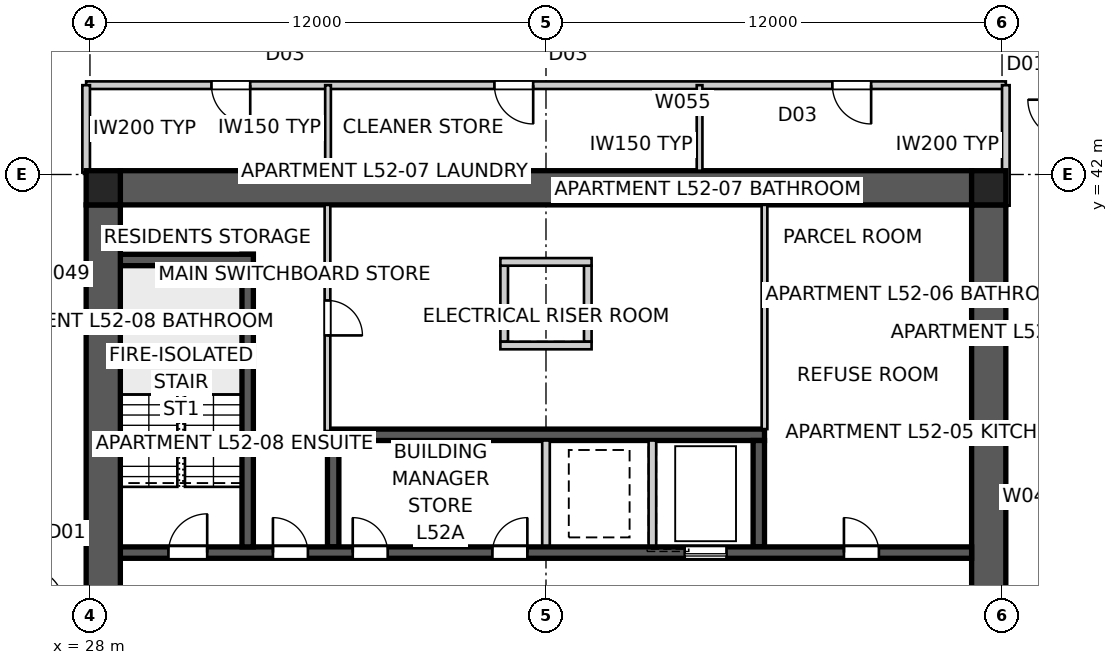
"""IFC4 building model, lengths in metres.
Left out: names, types, materials, properties, quantities, classifications, styles, units other than length and angle.
Written with IfcOpenShell. Run it as: python <this file> out.ifc"""

import sys

from ifc_helpers import new_model, si_unit, direction, frame, frame_2d, origin, origin_2d, place, context, subcontext, project, spatial, polyline, rectangle, outline, extrude, element, fill, save


model = new_model("IFC4")
c1 = context("Model", 3, precision=1e-05, world=origin(), true_north=direction((0.0, 1.0)))
c2 = subcontext(c1, "Body", "Model", "MODEL_VIEW")
j1 = project(units=[si_unit("LENGTHUNIT", "METRE"), si_unit("PLANEANGLEUNIT", "RADIAN")], contexts=[c1])
p1 = place(None, origin())
s1 = spatial("IfcSite", under=j1, at=p1, CompositionType="ELEMENT")
p2 = place(p1, origin())
s2 = spatial("IfcBuilding", under=s1, at=p2, CompositionType="ELEMENT")
p3 = place(p2, frame((0.0, 0.0, 189.6)))
s3 = spatial("IfcBuildingStorey", under=s2, at=p3, CompositionType="ELEMENT", Elevation=189.6)
p4 = place(p3, frame((28.8, 41.65, 0.0), z_axis=(0.0, 0.0, 1.0), x_axis=(1.0, 0.0, 0.0)))
e1 = element("IfcWall", 1, at=p4, inside=s3, PredefinedType="SHEAR", context=c2, shape_type="SweptSolid", body=[
    extrude(outline(polyline([(0.0, -0.45), (22.4, -0.45), (22.4, -0.025), (22.85, -0.025), (22.85, 0.025), (22.4, 0.025), (22.4, 0.45), (0.0, 0.45), (0.0, 0.025), (-0.45, 0.025), (-0.45, -0.025), (0.0, -0.025), (0.0, -0.45)])), origin(), (0.0, 0.0, 1.0), 3.4),
])
p5 = place(p3, frame((51.65, 18.8, 0.0), z_axis=(0.0, 0.0, 1.0), x_axis=(0.0, 1.0, 0.0)))
e2 = element("IfcWall", 2, at=p5, inside=s3, PredefinedType="SHEAR", context=c2, shape_type="SweptSolid", body=[
    extrude(outline(polyline([(0.0, -0.45), (22.4, -0.45), (22.4, -0.025), (22.85, -0.025), (22.85, 0.025), (22.4, 0.025), (22.4, 0.45), (0.0, 0.45), (0.0, 0.025), (-0.45, 0.025), (-0.45, -0.025), (0.0, -0.025), (0.0, -0.45)])), origin(), (0.0, 0.0, 1.0), 3.4),
])
p6 = place(p5, frame((11.14, 0.0, 0.0)))
e3 = element("IfcOpeningElement", 3, at=p6, cuts=e2, PredefinedType="OPENING", context=c2, shape_type="SweptSolid", body=[
    extrude(rectangle(XDim=1.02, YDim=2.4, at=frame_2d((0.51, 1.2))), frame((0.0, 0.46, 0.0), z_axis=(0.0, -1.0, 0.0), x_axis=(1.0, 0.0, 0.0)), (0.0, 0.0, 1.0), 0.92),
])
p7 = place(p3, frame((28.35, 41.2, 0.0), z_axis=(0.0, 0.0, 1.0), x_axis=(0.0, -1.0, 0.0)))
e4 = element("IfcWall", 4, at=p7, inside=s3, PredefinedType="SHEAR", context=c2, shape_type="SweptSolid", body=[
    extrude(outline(polyline([(0.0, -0.45), (22.4, -0.45), (22.4, -0.025), (22.85, -0.025), (22.85, 0.025), (22.4, 0.025), (22.4, 0.45), (0.0, 0.45), (0.0, 0.025), (-0.45, 0.025), (-0.45, -0.025), (0.0, -0.025), (0.0, -0.45)])), origin(), (0.0, 0.0, 1.0), 3.4),
])
p8 = place(p7, frame((11.14, 0.0, 0.0)))
e5 = element("IfcOpeningElement", 5, at=p8, cuts=e4, PredefinedType="OPENING", context=c2, shape_type="SweptSolid", body=[
    extrude(rectangle(XDim=1.02, YDim=2.4, at=frame_2d((0.51, 1.2))), frame((0.0, 0.46, 0.0), z_axis=(0.0, -1.0, 0.0), x_axis=(1.0, 0.0, 0.0)), (0.0, 0.0, 1.0), 0.92),
])
p9 = place(p3, frame((28.8, 32.05, 0.0), z_axis=(0.0, 0.0, 1.0), x_axis=(1.0, 0.0, 0.0)))
e6 = element("IfcWall", 6, at=p9, inside=s3, PredefinedType="SHEAR", context=c2, shape_type="SweptSolid", body=[
    extrude(rectangle(XDim=22.4, YDim=0.3, at=frame_2d((11.2, 0.0))), origin(), (0.0, 0.0, 1.0), 3.4),
])
p10 = place(p9, frame((19.04, 0.0, 0.0)))
e7 = element("IfcOpeningElement", 7, at=p10, cuts=e6, PredefinedType="OPENING", context=c2, shape_type="SweptSolid", body=[
    extrude(rectangle(XDim=0.92, YDim=2.1, at=frame_2d((0.46, 1.05))), frame((0.0, 0.16, 0.0), z_axis=(0.0, -1.0, 0.0), x_axis=(1.0, 0.0, 0.0)), (0.0, 0.0, 1.0), 0.32),
])
p11 = place(p9, frame((1.265, 0.0, 0.0)))
e8 = element("IfcOpeningElement", 8, at=p11, cuts=e6, PredefinedType="OPENING", context=c2, shape_type="SweptSolid", body=[
    extrude(rectangle(XDim=1.02, YDim=2.1, at=frame_2d((0.51, 1.05))), frame((0.0, 0.16, 0.0), z_axis=(0.0, -1.0, 0.0), x_axis=(1.0, 0.0, 0.0)), (0.0, 0.0, 1.0), 0.32),
])
p12 = place(p9, frame((4.015, 0.0, 0.0)))
e9 = element("IfcOpeningElement", 9, at=p12, cuts=e6, PredefinedType="OPENING", context=c2, shape_type="SweptSolid", body=[
    extrude(rectangle(XDim=0.92, YDim=2.1, at=frame_2d((0.46, 1.05))), frame((0.0, 0.16, 0.0), z_axis=(0.0, -1.0, 0.0), x_axis=(1.0, 0.0, 0.0)), (0.0, 0.0, 1.0), 0.32),
])
p13 = place(p9, frame((6.115, 0.0, 0.0)))
e10 = element("IfcOpeningElement", 10, at=p13, cuts=e6, PredefinedType="OPENING", context=c2, shape_type="SweptSolid", body=[
    extrude(rectangle(XDim=0.92, YDim=2.1, at=frame_2d((0.46, 1.05))), frame((0.0, 0.16, 0.0), z_axis=(0.0, -1.0, 0.0), x_axis=(1.0, 0.0, 0.0)), (0.0, 0.0, 1.0), 0.32),
])
p14 = place(p9, frame((9.79, 0.0, 0.0)))
e11 = element("IfcOpeningElement", 11, at=p14, cuts=e6, PredefinedType="OPENING", context=c2, shape_type="SweptSolid", body=[
    extrude(rectangle(XDim=0.92, YDim=2.1, at=frame_2d((0.46, 1.05))), frame((0.0, 0.16, 0.0), z_axis=(0.0, -1.0, 0.0), x_axis=(1.0, 0.0, 0.0)), (0.0, 0.0, 1.0), 0.32),
])
p15 = place(p9, frame((14.85, 0.0, 0.0)))
e12 = element("IfcOpeningElement", 12, at=p15, cuts=e6, PredefinedType="OPENING", context=c2, shape_type="SweptSolid", body=[
    extrude(rectangle(XDim=1.1, YDim=2.1, at=frame_2d((0.55, 1.05))), frame((0.0, 0.16, 0.0), z_axis=(0.0, -1.0, 0.0), x_axis=(1.0, 0.0, 0.0)), (0.0, 0.0, 1.0), 0.32),
])
p16 = place(p3, frame((34.25, 35.15, 0.0), z_axis=(0.0, 0.0, 1.0), x_axis=(1.0, 0.0, 0.0)))
e13 = element("IfcWall", 13, at=p16, inside=s3, PredefinedType="SHEAR", context=c2, shape_type="SweptSolid", body=[
    extrude(rectangle(XDim=11.5, YDim=0.3, at=frame_2d((5.75, 0.0))), origin(), (0.0, 0.0, 1.0), 3.4),
])
p17 = place(p3, frame((34.4, 32.2, 0.0), z_axis=(0.0, 0.0, 1.0), x_axis=(0.0, 1.0, 0.0)))
e14 = element("IfcWall", 14, at=p17, inside=s3, PredefinedType="SHEAR", context=c2, shape_type="SweptSolid", body=[
    extrude(rectangle(XDim=2.8, YDim=0.3, at=frame_2d((1.4, 0.0))), origin(), (0.0, 0.0, 1.0), 3.4),
])
for number, where, z_axis, x_axis in (
    (15, (40.0, 32.2, 0.0), (0.0, 0.0, 1.0), (0.0, 1.0, 0.0)),
    (16, (42.8, 32.2, 0.0), (0.0, 0.0, 1.0), (0.0, 1.0, 0.0)),
):
    element("IfcWall", number, at=place(p3, frame(where, z_axis=z_axis, x_axis=x_axis)), inside=s3, PredefinedType="SOLIDWALL", context=c2, shape_type="SweptSolid", body=[
        extrude(rectangle(XDim=2.8, YDim=0.2, at=frame_2d((1.4, 0.0))), origin(), (0.0, 0.0, 1.0), 3.4),
    ])
p18 = place(p3, frame((45.6, 32.2, 0.0), z_axis=(0.0, 0.0, 1.0), x_axis=(0.0, 1.0, 0.0)))
e17 = element("IfcWall", 17, at=p18, inside=s3, PredefinedType="SHEAR", context=c2, shape_type="SweptSolid", body=[
    extrude(rectangle(XDim=2.8, YDim=0.3, at=frame_2d((1.4, 0.0))), origin(), (0.0, 0.0, 1.0), 3.4),
])
p19 = place(p3, frame((32.15, 32.2, 0.0), z_axis=(0.0, 0.0, 1.0), x_axis=(0.0, 1.0, 0.0)))
e18 = element("IfcWall", 18, at=p19, inside=s3, PredefinedType="SHEAR", context=c2, shape_type="SweptSolid", body=[
    extrude(rectangle(XDim=7.7, YDim=0.3, at=frame_2d((3.85, 0.0))), origin(), (0.0, 0.0, 1.0), 3.4),
])
p20 = place(p3, frame((28.8, 39.75, 0.0), z_axis=(0.0, 0.0, 1.0), x_axis=(1.0, 0.0, 0.0)))
e19 = element("IfcWall", 19, at=p20, inside=s3, PredefinedType="SHEAR", context=c2, shape_type="SweptSolid", body=[
    extrude(rectangle(XDim=3.5, YDim=0.3, at=frame_2d((1.75, 0.0))), origin(), (0.0, 0.0, 1.0), 3.4),
])
for number, where, z_axis, x_axis in (
    (20, (38.9, 37.6, 0.0), (0.0, 0.0, 1.0), (0.0, 1.0, 0.0)),
    (21, (41.1, 37.6, 0.0), (0.0, 0.0, 1.0), (0.0, 1.0, 0.0)),
):
    element("IfcWall", number, at=place(p3, frame(where, z_axis=z_axis, x_axis=x_axis)), inside=s3, PredefinedType="SOLIDWALL", context=c2, shape_type="SweptSolid", body=[
        extrude(rectangle(XDim=2.0, YDim=0.2, at=frame_2d((1.0, 0.0))), origin(), (0.0, 0.0, 1.0), 3.4),
    ])
for number, where, z_axis, x_axis in (
    (22, (38.8, 37.5, 0.0), (0.0, 0.0, 1.0), (1.0, 0.0, 0.0)),
    (23, (38.8, 39.7, 0.0), (0.0, 0.0, 1.0), (1.0, 0.0, 0.0)),
):
    element("IfcWall", number, at=place(p3, frame(where, z_axis=z_axis, x_axis=x_axis)), inside=s3, PredefinedType="SOLIDWALL", context=c2, shape_type="SweptSolid", body=[
        extrude(rectangle(XDim=2.4, YDim=0.2, at=frame_2d((1.2, 0.0))), origin(), (0.0, 0.0, 1.0), 3.4),
    ])
for number, where, z_axis, x_axis in (
    (24, (51.65, 41.65, 0.0), (0.0, 0.0, 1.0), (1.0, 0.0, 0.0)),
    (25, (28.35, 41.65, 0.0), (0.0, 0.0, 1.0), (1.0, 0.0, 0.0)),
):
    element("IfcColumn", number, at=place(p3, frame(where, z_axis=z_axis, x_axis=x_axis)), inside=s3, PredefinedType="COLUMN", context=c2, shape_type="SweptSolid", body=[
        extrude(rectangle(XDim=0.9, YDim=0.9, at=origin_2d()), origin(), (0.0, 0.0, 1.0), 3.4),
    ])
p21 = place(p3, frame((34.25, 41.2, 0.0), z_axis=(0.0, 0.0, 1.0), x_axis=(0.0, -1.0, 0.0)))
e26 = element("IfcWall", 26, at=p21, inside=s3, PredefinedType="SOLIDWALL", context=c2, shape_type="SweptSolid", body=[
    extrude(rectangle(XDim=5.95, YDim=0.15, at=frame_2d((2.975, 0.0))), origin(), (0.0, 0.0, 1.0), 3.25),
])
p22 = place(p21, frame((2.515, 0.0, 0.0)))
e27 = element("IfcOpeningElement", 27, at=p22, cuts=e26, PredefinedType="OPENING", context=c2, shape_type="SweptSolid", body=[
    extrude(rectangle(XDim=0.92, YDim=2.1, at=frame_2d((0.46, 1.05))), frame((0.0, 0.085, 0.0), z_axis=(0.0, -1.0, 0.0), x_axis=(1.0, 0.0, 0.0)), (0.0, 0.0, 1.0), 0.17),
])
p23 = place(p3, frame((45.75, 41.2, 0.0), z_axis=(0.0, 0.0, 1.0), x_axis=(0.0, -1.0, 0.0)))
e28 = element("IfcWall", 28, at=p23, inside=s3, PredefinedType="SOLIDWALL", context=c2, shape_type="SweptSolid", body=[
    extrude(rectangle(XDim=5.9, YDim=0.15, at=frame_2d((2.95, 0.0))), origin(), (0.0, 0.0, 1.0), 3.25),
])
p24 = place(p3, frame((52.1, 44.35, 0.0), z_axis=(0.0, 0.0, 1.0), x_axis=(-1.0, 0.0, 0.0)))
e29 = element("IfcWall", 29, at=p24, inside=s3, PredefinedType="PARTITIONING", context=c2, shape_type="SweptSolid", body=[
    extrude(rectangle(XDim=24.2, YDim=0.2, at=frame_2d((12.1, 0.0))), origin(), (0.0, 0.0, 1.0), 3.25),
])
p25 = place(p24, frame((12.437, 0.0, 0.0)))
e30 = element("IfcOpeningElement", 30, at=p25, cuts=e29, PredefinedType="OPENING", context=c2, shape_type="SweptSolid", body=[
    extrude(rectangle(XDim=1.02, YDim=2.1, at=frame_2d((0.51, 1.05))), frame((0.0, 0.11, 0.0), z_axis=(0.0, -1.0, 0.0), x_axis=(1.0, 0.0, 0.0)), (0.0, 0.0, 1.0), 0.22),
])
p26 = place(p24, frame((3.544, 0.0, 0.0)))
e31 = element("IfcOpeningElement", 31, at=p26, cuts=e29, PredefinedType="OPENING", context=c2, shape_type="SweptSolid", body=[
    extrude(rectangle(XDim=1.02, YDim=2.1, at=frame_2d((0.51, 1.05))), frame((0.0, 0.11, 0.0), z_axis=(0.0, -1.0, 0.0), x_axis=(1.0, 0.0, 0.0)), (0.0, 0.0, 1.0), 0.22),
])
p27 = place(p24, frame((19.883, 0.0, 0.0)))
e32 = element("IfcOpeningElement", 32, at=p27, cuts=e29, PredefinedType="OPENING", context=c2, shape_type="SweptSolid", body=[
    extrude(rectangle(XDim=1.02, YDim=2.1, at=frame_2d((0.51, 1.05))), frame((0.0, 0.11, 0.0), z_axis=(0.0, -1.0, 0.0), x_axis=(1.0, 0.0, 0.0)), (0.0, 0.0, 1.0), 0.22),
])
p28 = place(p3, frame((27.9, 44.35, 0.0), z_axis=(0.0, 0.0, 1.0), x_axis=(0.0, -1.0, 0.0)))
e33 = element("IfcWall", 33, at=p28, inside=s3, PredefinedType="PARTITIONING", context=c2, shape_type="SweptSolid", body=[
    extrude(rectangle(XDim=2.3, YDim=0.2, at=frame_2d((1.15, 0.0))), origin(), (0.0, 0.0, 1.0), 3.25),
])
p29 = place(p3, frame((52.1, 41.18, 0.0), z_axis=(0.0, 0.0, 1.0), x_axis=(0.0, 1.0, 0.0)))
e34 = element("IfcWall", 34, at=p29, inside=s3, PredefinedType="PARTITIONING", context=c2, shape_type="SweptSolid", body=[
    extrude(rectangle(XDim=3.17, YDim=0.2, at=frame_2d((1.585, 0.0))), origin(), (0.0, 0.0, 1.0), 3.25),
])
p30 = place(p3, frame((34.265, 42.1, 0.0), z_axis=(0.0, 0.0, 1.0), x_axis=(0.0, 1.0, 0.0)))
e35 = element("IfcWall", 35, at=p30, inside=s3, PredefinedType="SOLIDWALL", context=c2, shape_type="SweptSolid", body=[
    extrude(rectangle(XDim=2.25, YDim=0.15, at=frame_2d((1.125, 0.0))), origin(), (0.0, 0.0, 1.0), 2.796),
])
p31 = place(p3, frame((44.042, 42.1, 0.0), z_axis=(0.0, 0.0, 1.0), x_axis=(0.0, 1.0, 0.0)))
e36 = element("IfcWall", 36, at=p31, inside=s3, PredefinedType="SOLIDWALL", context=c2, shape_type="SweptSolid", body=[
    extrude(rectangle(XDim=2.25, YDim=0.15, at=frame_2d((1.125, 0.0))), origin(), (0.0, 0.0, 1.0), 3.25),
])
p32 = place(p10, origin())
e37 = element("IfcDoor", 37, at=p32, inside=s3, OperationType="SINGLE_SWING_LEFT", PredefinedType="DOOR", context=c2, shape_type="SweptSolid", body=[
    extrude(rectangle(XDim=0.92, YDim=2.1, at=frame_2d((0.46, 1.05))), frame((0.0, 0.025, 0.0), z_axis=(0.0, -1.0, 0.0), x_axis=(1.0, 0.0, 0.0)), (0.0, 0.0, 1.0), 0.05),
])
fill(e7, e37)
p33 = place(p11, origin())
e38 = element("IfcDoor", 38, at=p33, inside=s3, OperationType="SINGLE_SWING_RIGHT", PredefinedType="DOOR", context=c2, shape_type="SweptSolid", body=[
    extrude(rectangle(XDim=1.02, YDim=2.1, at=frame_2d((0.51, 1.05))), frame((0.0, 0.025, 0.0), z_axis=(0.0, -1.0, 0.0), x_axis=(1.0, 0.0, 0.0)), (0.0, 0.0, 1.0), 0.05),
])
fill(e8, e38)
p34 = place(p12, origin())
e39 = element("IfcDoor", 39, at=p34, inside=s3, OperationType="SINGLE_SWING_LEFT", PredefinedType="DOOR", context=c2, shape_type="SweptSolid", body=[
    extrude(rectangle(XDim=0.92, YDim=2.1, at=frame_2d((0.46, 1.05))), frame((0.0, 0.025, 0.0), z_axis=(0.0, -1.0, 0.0), x_axis=(1.0, 0.0, 0.0)), (0.0, 0.0, 1.0), 0.05),
])
fill(e9, e39)
p35 = place(p25, origin())
e40 = element("IfcDoor", 40, at=p35, inside=s3, OperationType="SINGLE_SWING_LEFT", PredefinedType="DOOR", context=c2, shape_type="SweptSolid", body=[
    extrude(rectangle(XDim=1.02, YDim=2.1, at=frame_2d((0.51, 1.05))), frame((0.0, 0.025, 0.0), z_axis=(0.0, -1.0, 0.0), x_axis=(1.0, 0.0, 0.0)), (0.0, 0.0, 1.0), 0.05),
])
fill(e30, e40)
p36 = place(p26, origin())
e41 = element("IfcDoor", 41, at=p36, inside=s3, OperationType="SINGLE_SWING_LEFT", PredefinedType="DOOR", context=c2, shape_type="SweptSolid", body=[
    extrude(rectangle(XDim=1.02, YDim=2.1, at=frame_2d((0.51, 1.05))), frame((0.0, 0.025, 0.0), z_axis=(0.0, -1.0, 0.0), x_axis=(1.0, 0.0, 0.0)), (0.0, 0.0, 1.0), 0.05),
])
fill(e31, e41)
p37 = place(p27, origin())
e42 = element("IfcDoor", 42, at=p37, inside=s3, OperationType="SINGLE_SWING_LEFT", PredefinedType="DOOR", context=c2, shape_type="SweptSolid", body=[
    extrude(rectangle(XDim=1.02, YDim=2.1, at=frame_2d((0.51, 1.05))), frame((0.0, 0.025, 0.0), z_axis=(0.0, -1.0, 0.0), x_axis=(1.0, 0.0, 0.0)), (0.0, 0.0, 1.0), 0.05),
])
fill(e32, e42)
p38 = place(p22, origin())
e43 = element("IfcDoor", 43, at=p38, inside=s3, OperationType="SINGLE_SWING_RIGHT", PredefinedType="DOOR", context=c2, shape_type="SweptSolid", body=[
    extrude(rectangle(XDim=0.92, YDim=2.1, at=frame_2d((0.46, 1.05))), frame((0.0, 0.025, 0.0), z_axis=(0.0, -1.0, 0.0), x_axis=(1.0, 0.0, 0.0)), (0.0, 0.0, 1.0), 0.05),
])
fill(e27, e43)
p39 = place(p13, origin())
e44 = element("IfcDoor", 44, at=p39, inside=s3, OperationType="SINGLE_SWING_LEFT", PredefinedType="DOOR", context=c2, shape_type="SweptSolid", body=[
    extrude(rectangle(XDim=0.92, YDim=2.1, at=frame_2d((0.46, 1.05))), frame((0.0, 0.025, 0.0), z_axis=(0.0, -1.0, 0.0), x_axis=(1.0, 0.0, 0.0)), (0.0, 0.0, 1.0), 0.05),
])
fill(e10, e44)
p40 = place(p14, origin())
e45 = element("IfcDoor", 45, at=p40, inside=s3, OperationType="SINGLE_SWING_RIGHT", PredefinedType="DOOR", context=c2, shape_type="SweptSolid", body=[
    extrude(rectangle(XDim=0.92, YDim=2.1, at=frame_2d((0.46, 1.05))), frame((0.0, 0.025, 0.0), z_axis=(0.0, -1.0, 0.0), x_axis=(1.0, 0.0, 0.0)), (0.0, 0.0, 1.0), 0.05),
])
fill(e11, e45)
p41 = place(p15, origin())
e46 = element("IfcDoor", 46, at=p41, inside=s3, OperationType="SLIDING_TO_LEFT", PredefinedType="DOOR", context=c2, shape_type="SweptSolid", body=[
    extrude(rectangle(XDim=1.1, YDim=2.1, at=frame_2d((0.55, 1.05))), frame((0.0, 0.025, 0.0), z_axis=(0.0, -1.0, 0.0), x_axis=(1.0, 0.0, 0.0)), (0.0, 0.0, 1.0), 0.05),
])
fill(e12, e46)
save(model, sys.argv[1])
